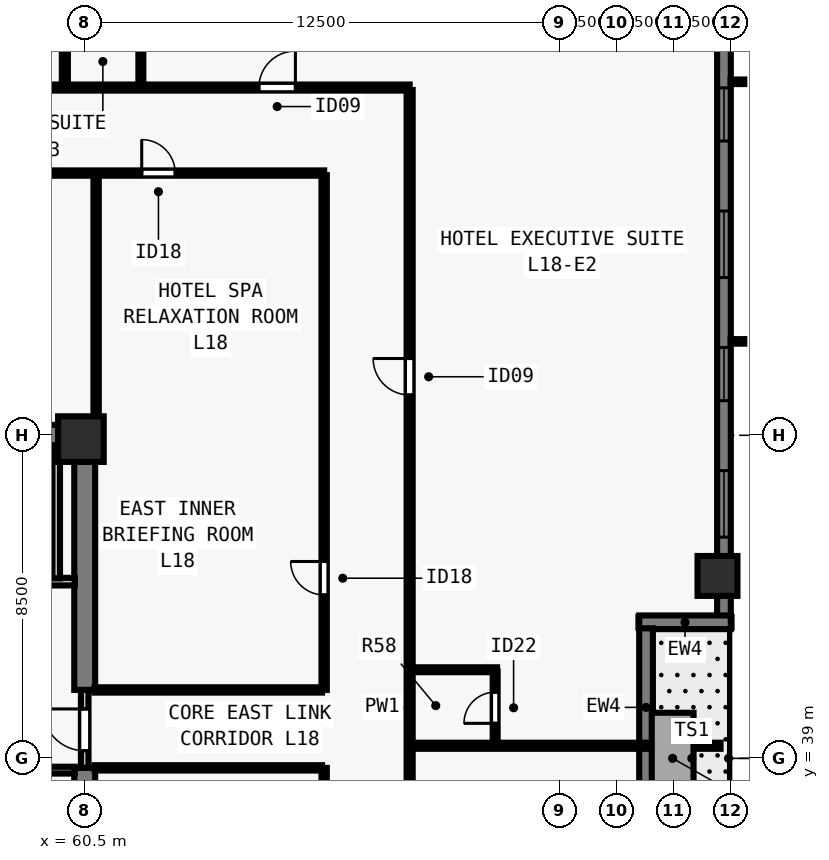
"""IFC4 building model, lengths in metres.
Left out: names, types, materials, properties, quantities, classifications, styles, units other than length and angle.
Written with IfcOpenShell. Run it as: python <this file> out.ifc"""

import sys

from ifc_helpers import new_model, si_unit, direction, frame, frame_2d, origin, origin_2d, place, context, subcontext, project, spatial, rectangle, extrude, element, fill, save


model = new_model("IFC4")
c1 = context("Model", 3, precision=1e-05, world=origin(), true_north=direction((0.0, 1.0)))
c2 = subcontext(c1, "Body", "Model", "MODEL_VIEW")
j1 = project(units=[si_unit("LENGTHUNIT", "METRE"), si_unit("PLANEANGLEUNIT", "RADIAN")], contexts=[c1])
p1 = place(None, origin())
s1 = spatial("IfcSite", under=j1, at=p1, CompositionType="ELEMENT")
p2 = place(p1, origin())
s2 = spatial("IfcBuilding", under=s1, at=p2, CompositionType="ELEMENT")
p3 = place(p2, frame((0.0, 0.0, 69.0)))
s3 = spatial("IfcBuildingStorey", under=s2, at=p3, CompositionType="ELEMENT", Elevation=69.0)
p4 = place(p3, frame((60.4, 47.4, 0.0), z_axis=(0.0, 0.0, 1.0), x_axis=(1.0, 0.0, 0.0)))
e1 = element("IfcColumn", 1, at=p4, inside=s3, PredefinedType="COLUMN", context=c2, shape_type="SweptSolid", body=[
    extrude(rectangle(XDim=1.2, YDim=1.2, at=origin_2d()), origin(), (0.0, 0.0, 1.0), 3.5),
])
p5 = place(p3, frame((77.15, 43.8, 0.0), z_axis=(0.0, 0.0, 1.0), x_axis=(0.0, 1.0, 0.0)))
e2 = element("IfcColumn", 2, at=p5, inside=s3, PredefinedType="COLUMN", context=c2, shape_type="SweptSolid", body=[
    extrude(rectangle(XDim=1.05, YDim=1.05, at=origin_2d()), origin(), (0.0, 0.0, 1.0), 3.5),
])
p6 = place(p3, frame((77.32, 61.5, 0.0), z_axis=(0.0, 0.0, 1.0), x_axis=(0.0, -1.0, 0.0)))
e3 = element("IfcWall", 3, at=p6, inside=s3, PredefinedType="SOLIDWALL", context=c2, shape_type="SweptSolid", body=[
    extrude(rectangle(XDim=18.762, YDim=0.36, at=frame_2d((9.381, 0.0))), origin(), (0.0, 0.0, 1.0), 3.28),
])
p7 = place(p6, frame((4.858, 0.0, 0.8)))
e4 = element("IfcOpeningElement", 4, at=p7, cuts=e3, PredefinedType="OPENING", context=c2, shape_type="SweptSolid", body=[
    extrude(rectangle(XDim=1.4, YDim=1.544, at=frame_2d((0.7, 0.772))), frame((0.0, 0.19, 0.0), z_axis=(0.0, -1.0, 0.0), x_axis=(1.0, 0.0, 0.0)), (0.0, 0.0, 1.0), 0.38),
])
p8 = place(p6, frame((8.098, 0.0, 0.8)))
e5 = element("IfcOpeningElement", 5, at=p8, cuts=e3, PredefinedType="OPENING", context=c2, shape_type="SweptSolid", body=[
    extrude(rectangle(XDim=1.75, YDim=1.544, at=frame_2d((0.875, 0.772))), frame((0.0, 0.19, 0.0), z_axis=(0.0, -1.0, 0.0), x_axis=(1.0, 0.0, 0.0)), (0.0, 0.0, 1.0), 0.38),
])
p9 = place(p6, frame((11.689, 0.0, 0.8)))
e6 = element("IfcOpeningElement", 6, at=p9, cuts=e3, PredefinedType="OPENING", context=c2, shape_type="SweptSolid", body=[
    extrude(rectangle(XDim=1.4, YDim=1.544, at=frame_2d((0.7, 0.772))), frame((0.0, 0.19, 0.0), z_axis=(0.0, -1.0, 0.0), x_axis=(1.0, 0.0, 0.0)), (0.0, 0.0, 1.0), 0.38),
])
p10 = place(p6, frame((14.929, 0.0, 0.8)))
e7 = element("IfcOpeningElement", 7, at=p10, cuts=e3, PredefinedType="OPENING", context=c2, shape_type="SweptSolid", body=[
    extrude(rectangle(XDim=1.75, YDim=1.544, at=frame_2d((0.875, 0.772))), frame((0.0, 0.19, 0.0), z_axis=(0.0, -1.0, 0.0), x_axis=(1.0, 0.0, 0.0)), (0.0, 0.0, 1.0), 0.38),
])
p11 = place(p3, frame((77.5, 42.58, 0.0), z_axis=(0.0, 0.0, 1.0), x_axis=(-1.0, 0.0, 0.0)))
e8 = element("IfcWall", 8, at=p11, inside=s3, PredefinedType="SOLIDWALL", context=c2, shape_type="SweptSolid", body=[
    extrude(rectangle(XDim=2.41, YDim=0.36, at=frame_2d((1.205, 0.0))), origin(), (0.0, 0.0, 1.0), 3.28),
])
p12 = place(p3, frame((75.27, 42.422, 0.0), z_axis=(0.0, 0.0, 1.0), x_axis=(0.0, -1.0, 0.0)))
e9 = element("IfcWall", 9, at=p12, inside=s3, PredefinedType="SOLIDWALL", context=c2, shape_type="SweptSolid", body=[
    extrude(rectangle(XDim=7.182, YDim=0.36, at=frame_2d((3.591, 0.0))), origin(), (0.0, 0.0, 1.0), 3.28),
])
p13 = place(p12, frame((4.311, 0.0, 0.0)))
e10 = element("IfcOpeningElement", 10, at=p13, cuts=e9, PredefinedType="OPENING", context=c2, shape_type="SweptSolid", body=[
    extrude(rectangle(XDim=1.0, YDim=2.15, at=frame_2d((0.5, 1.075))), frame((0.0, 0.19, 0.0), z_axis=(0.0, -1.0, 0.0), x_axis=(1.0, 0.0, 0.0)), (0.0, 0.0, 1.0), 0.38),
])
p14 = place(p3, frame((43.225, 47.5, 0.0), z_axis=(0.0, 0.0, 1.0), x_axis=(1.0, 0.0, 0.0)))
e11 = element("IfcWall", 11, at=p14, inside=s3, PredefinedType="SHEAR", context=c2, shape_type="SweptSolid", body=[
    extrude(rectangle(XDim=17.55, YDim=0.55, at=frame_2d((8.775, 0.0))), origin(), (0.0, 0.0, 1.0), 3.28),
])
p15 = place(p3, frame((60.5, 30.765, 0.0), z_axis=(0.0, 0.0, 1.0), x_axis=(0.0, 1.0, 0.0)))
e12 = element("IfcWall", 12, at=p15, inside=s3, PredefinedType="SHEAR", context=c2, shape_type="SweptSolid", body=[
    extrude(rectangle(XDim=7.985, YDim=0.55, at=frame_2d((3.993, 0.0))), origin(), (0.0, 0.0, 1.0), 3.28),
])
p16 = place(p3, frame((60.5, 40.8, 0.0), z_axis=(0.0, 0.0, 1.0), x_axis=(0.0, 1.0, 0.0)))
e13 = element("IfcWall", 13, at=p16, inside=s3, PredefinedType="SHEAR", context=c2, shape_type="SweptSolid", body=[
    extrude(rectangle(XDim=6.435, YDim=0.55, at=frame_2d((3.218, 0.0))), origin(), (0.0, 0.0, 1.0), 3.28),
])
p17 = place(p3, frame((60.5, 38.75, 0.0), z_axis=(0.0, 0.0, 1.0), x_axis=(0.0, 1.0, 0.0)))
e14 = element("IfcWall", 14, at=p17, inside=s3, PredefinedType="SOLIDWALL", context=c2, shape_type="SweptSolid", body=[
    extrude(rectangle(XDim=2.05, YDim=0.2, at=frame_2d((1.025, 0.0))), origin(), (0.0, 0.0, 1.0), 3.28),
])
p18 = place(p17, frame((0.45, 0.0, 0.0)))
e15 = element("IfcOpeningElement", 15, at=p18, cuts=e14, PredefinedType="OPENING", context=c2, shape_type="SweptSolid", body=[
    extrude(rectangle(XDim=1.1, YDim=2.15, at=frame_2d((0.55, 1.075))), frame((0.0, 0.11, 0.0), z_axis=(0.0, -1.0, 0.0), x_axis=(1.0, 0.0, 0.0)), (0.0, 0.0, 1.0), 0.22),
])
p19 = place(p3, frame((56.735, 43.65, 0.0), z_axis=(0.0, 0.0, 1.0), x_axis=(1.0, 0.0, 0.0)))
e16 = element("IfcWall", 16, at=p19, inside=s3, PredefinedType="SOLIDWALL", context=c2, shape_type="SweptSolid", body=[
    extrude(rectangle(XDim=3.505, YDim=0.2, at=frame_2d((1.752, 0.0))), origin(), (0.0, 0.0, 1.0), 3.28),
])
p20 = place(p19, frame((1.295, 0.0, 0.0)))
e17 = element("IfcOpeningElement", 17, at=p20, cuts=e16, PredefinedType="OPENING", context=c2, shape_type="SweptSolid", body=[
    extrude(rectangle(XDim=1.1, YDim=2.2, at=frame_2d((0.55, 1.1))), frame((0.0, 0.11, 0.0), z_axis=(0.0, -1.0, 0.0), x_axis=(1.0, 0.0, 0.0)), (0.0, 0.0, 1.0), 0.22),
])
p21 = place(p3, frame((59.75, 43.735, 0.0), z_axis=(0.0, 0.0, 1.0), x_axis=(0.0, 1.0, 0.0)))
e18 = element("IfcWall", 18, at=p21, inside=s3, PredefinedType="SOLIDWALL", context=c2, shape_type="SweptSolid", body=[
    extrude(rectangle(XDim=3.505, YDim=0.2, at=frame_2d((1.752, 0.0))), origin(), (0.0, 0.0, 1.0), 3.28),
])
p22 = place(p3, frame((34.95, 56.65, 0.0), z_axis=(0.0, 0.0, 1.0), x_axis=(1.0, 0.0, 0.0)))
e19 = element("IfcWall", 19, at=p22, inside=s3, PredefinedType="PARTITIONING", context=c2, shape_type="SweptSolid", body=[
    extrude(rectangle(XDim=34.1, YDim=0.16, at=frame_2d((17.05, 0.0))), origin(), (0.0, 0.0, 1.0), 3.28),
])
p23 = place(p22, frame((4.166, 0.0, 0.0)))
e20 = element("IfcOpeningElement", 20, at=p23, cuts=e19, PredefinedType="OPENING", context=c2, shape_type="SweptSolid", body=[
    extrude(rectangle(XDim=0.96, YDim=2.15, at=frame_2d((0.48, 1.075))), frame((0.0, 0.09, 0.0), z_axis=(0.0, -1.0, 0.0), x_axis=(1.0, 0.0, 0.0)), (0.0, 0.0, 1.0), 0.18),
])
p24 = place(p22, frame((17.73, 0.0, 0.0)))
e21 = element("IfcOpeningElement", 21, at=p24, cuts=e19, PredefinedType="OPENING", context=c2, shape_type="SweptSolid", body=[
    extrude(rectangle(XDim=0.96, YDim=2.15, at=frame_2d((0.48, 1.075))), frame((0.0, 0.09, 0.0), z_axis=(0.0, -1.0, 0.0), x_axis=(1.0, 0.0, 0.0)), (0.0, 0.0, 1.0), 0.18),
])
p25 = place(p22, frame((30.134, 0.0, 0.0)))
e22 = element("IfcOpeningElement", 22, at=p25, cuts=e19, PredefinedType="OPENING", context=c2, shape_type="SweptSolid", body=[
    extrude(rectangle(XDim=0.96, YDim=2.15, at=frame_2d((0.48, 1.075))), frame((0.0, 0.09, 0.0), z_axis=(0.0, -1.0, 0.0), x_axis=(1.0, 0.0, 0.0)), (0.0, 0.0, 1.0), 0.18),
])
p26 = place(p3, frame((69.05, 21.415, 0.0), z_axis=(0.0, 0.0, 1.0), x_axis=(0.0, 1.0, 0.0)))
e23 = element("IfcWall", 23, at=p26, inside=s3, PredefinedType="PARTITIONING", context=c2, shape_type="SweptSolid", body=[
    extrude(rectangle(XDim=35.17, YDim=0.16, at=frame_2d((17.585, 0.0))), origin(), (0.0, 0.0, 1.0), 3.28),
])
p27 = place(p26, frame((9.746, 0.0, 0.0)))
e24 = element("IfcOpeningElement", 24, at=p27, cuts=e23, PredefinedType="OPENING", context=c2, shape_type="SweptSolid", body=[
    extrude(rectangle(XDim=0.96, YDim=2.15, at=frame_2d((0.48, 1.075))), frame((0.0, 0.09, 0.0), z_axis=(0.0, -1.0, 0.0), x_axis=(1.0, 0.0, 0.0)), (0.0, 0.0, 1.0), 0.18),
])
p28 = place(p26, frame((27.146, 0.0, 0.0)))
e25 = element("IfcOpeningElement", 25, at=p28, cuts=e23, PredefinedType="OPENING", context=c2, shape_type="SweptSolid", body=[
    extrude(rectangle(XDim=0.96, YDim=2.15, at=frame_2d((0.48, 1.075))), frame((0.0, 0.09, 0.0), z_axis=(0.0, -1.0, 0.0), x_axis=(1.0, 0.0, 0.0)), (0.0, 0.0, 1.0), 0.18),
])
p29 = place(p3, frame((37.2, 54.4, 0.0), z_axis=(0.0, 0.0, 1.0), x_axis=(1.0, 0.0, 0.0)))
e26 = element("IfcWall", 26, at=p29, inside=s3, PredefinedType="PARTITIONING", context=c2, shape_type="SweptSolid", body=[
    extrude(rectangle(XDim=29.6, YDim=0.14, at=frame_2d((14.8, 0.0))), origin(), (0.0, 0.0, 1.0), 3.28),
])
p30 = place(p29, frame((2.2, 0.0, 0.0)))
e27 = element("IfcOpeningElement", 27, at=p30, cuts=e26, PredefinedType="OPENING", context=c2, shape_type="SweptSolid", body=[
    extrude(rectangle(XDim=0.88, YDim=2.1, at=frame_2d((0.44, 1.05))), frame((0.0, 0.08, 0.0), z_axis=(0.0, -1.0, 0.0), x_axis=(1.0, 0.0, 0.0)), (0.0, 0.0, 1.0), 0.16),
])
p31 = place(p29, frame((15.3, 0.0, 0.0)))
e28 = element("IfcOpeningElement", 28, at=p31, cuts=e26, PredefinedType="OPENING", context=c2, shape_type="SweptSolid", body=[
    extrude(rectangle(XDim=0.88, YDim=2.1, at=frame_2d((0.44, 1.05))), frame((0.0, 0.08, 0.0), z_axis=(0.0, -1.0, 0.0), x_axis=(1.0, 0.0, 0.0)), (0.0, 0.0, 1.0), 0.16),
])
p32 = place(p29, frame((24.8, 0.0, 0.0)))
e29 = element("IfcOpeningElement", 29, at=p32, cuts=e26, PredefinedType="OPENING", context=c2, shape_type="SweptSolid", body=[
    extrude(rectangle(XDim=0.88, YDim=2.1, at=frame_2d((0.44, 1.05))), frame((0.0, 0.08, 0.0), z_axis=(0.0, -1.0, 0.0), x_axis=(1.0, 0.0, 0.0)), (0.0, 0.0, 1.0), 0.16),
])
p33 = place(p3, frame((66.8, 23.655, 0.0), z_axis=(0.0, 0.0, 1.0), x_axis=(0.0, 1.0, 0.0)))
e30 = element("IfcWall", 30, at=p33, inside=s3, PredefinedType="PARTITIONING", context=c2, shape_type="SweptSolid", body=[
    extrude(rectangle(XDim=15.095, YDim=0.14, at=frame_2d((7.547, 0.0))), origin(), (0.0, 0.0, 1.0), 3.28),
])
p34 = place(p33, frame((2.445, 0.0, 0.0)))
e31 = element("IfcOpeningElement", 31, at=p34, cuts=e30, PredefinedType="OPENING", context=c2, shape_type="SweptSolid", body=[
    extrude(rectangle(XDim=0.88, YDim=2.1, at=frame_2d((0.44, 1.05))), frame((0.0, 0.08, 0.0), z_axis=(0.0, -1.0, 0.0), x_axis=(1.0, 0.0, 0.0)), (0.0, 0.0, 1.0), 0.16),
])
p35 = place(p3, frame((66.8, 40.8, 0.0), z_axis=(0.0, 0.0, 1.0), x_axis=(0.0, 1.0, 0.0)))
e32 = element("IfcWall", 32, at=p35, inside=s3, PredefinedType="PARTITIONING", context=c2, shape_type="SweptSolid", body=[
    extrude(rectangle(XDim=13.545, YDim=0.14, at=frame_2d((6.772, 0.0))), origin(), (0.0, 0.0, 1.0), 3.28),
])
p36 = place(p35, frame((2.5, 0.0, 0.0)))
e33 = element("IfcOpeningElement", 33, at=p36, cuts=e32, PredefinedType="OPENING", context=c2, shape_type="SweptSolid", body=[
    extrude(rectangle(XDim=0.88, YDim=2.1, at=frame_2d((0.44, 1.05))), frame((0.0, 0.08, 0.0), z_axis=(0.0, -1.0, 0.0), x_axis=(1.0, 0.0, 0.0)), (0.0, 0.0, 1.0), 0.16),
])
for number, where, z_axis, x_axis in (
    (34, (60.76, 38.75, 0.0), (0.0, 0.0, 1.0), (1.0, 0.0, 0.0)),
    (35, (60.76, 40.8, 0.0), (0.0, 0.0, 1.0), (1.0, 0.0, 0.0)),
):
    element("IfcWall", number, at=place(p3, frame(where, z_axis=z_axis, x_axis=x_axis)), inside=s3, PredefinedType="PARTITIONING", context=c2, shape_type="SweptSolid", body=[
        extrude(rectangle(XDim=5.985, YDim=0.14, at=frame_2d((2.993, 0.0))), origin(), (0.0, 0.0, 1.0), 3.28),
    ])
p37 = place(p3, frame((60.8, 47.76, 0.0), z_axis=(0.0, 0.0, 1.0), x_axis=(0.0, 1.0, 0.0)))
e36 = element("IfcWall", 36, at=p37, inside=s3, PredefinedType="PARTITIONING", context=c2, shape_type="SweptSolid", body=[
    extrude(rectangle(XDim=6.585, YDim=0.14, at=frame_2d((3.292, 0.0))), origin(), (0.0, 0.0, 1.0), 2.439),
])
p38 = place(p3, frame((59.978, 56.715, 0.0), z_axis=(0.0, 0.0, 1.0), x_axis=(0.0, 1.0, 0.0)))
e37 = element("IfcWall", 37, at=p38, inside=s3, PredefinedType="PARTITIONING", context=c2, shape_type="SweptSolid", body=[
    extrude(rectangle(XDim=7.44, YDim=0.16, at=frame_2d((3.72, 0.0))), origin(), (0.0, 0.0, 1.0), 3.28),
])
p39 = place(p3, frame((61.978, 56.715, 0.0), z_axis=(0.0, 0.0, 1.0), x_axis=(0.0, 1.0, 0.0)))
e38 = element("IfcWall", 38, at=p39, inside=s3, PredefinedType="PLUMBINGWALL", context=c2, shape_type="SweptSolid", body=[
    extrude(rectangle(XDim=2.235, YDim=0.13, at=frame_2d((1.117, 0.0))), origin(), (0.0, 0.0, 1.0), 3.28),
])
p40 = place(p3, frame((69.115, 39.332, 0.0), z_axis=(0.0, 0.0, 1.0), x_axis=(1.0, 0.0, 0.0)))
e39 = element("IfcWall", 39, at=p40, inside=s3, PredefinedType="PARTITIONING", context=c2, shape_type="SweptSolid", body=[
    extrude(rectangle(XDim=8.115, YDim=0.16, at=frame_2d((4.058, 0.0))), origin(), (0.0, 0.0, 1.0), 3.28),
])
p41 = place(p3, frame((69.115, 41.332, 0.0), z_axis=(0.0, 0.0, 1.0), x_axis=(1.0, 0.0, 0.0)))
e40 = element("IfcWall", 40, at=p41, inside=s3, PredefinedType="PLUMBINGWALL", context=c2, shape_type="SweptSolid", body=[
    extrude(rectangle(XDim=2.235, YDim=0.13, at=frame_2d((1.118, 0.0))), origin(), (0.0, 0.0, 1.0), 3.28),
])
p42 = place(p3, frame((71.3, 39.396, 0.0), z_axis=(0.0, 0.0, 1.0), x_axis=(0.0, 1.0, 0.0)))
e41 = element("IfcWall", 41, at=p42, inside=s3, PredefinedType="PLUMBINGWALL", context=c2, shape_type="SweptSolid", body=[
    extrude(rectangle(XDim=1.885, YDim=0.13, at=frame_2d((0.942, 0.0))), origin(), (0.0, 0.0, 1.0), 3.28),
])
p43 = place(p42, frame((0.525, 0.0, 0.0)))
e42 = element("IfcOpeningElement", 42, at=p43, cuts=e41, PredefinedType="OPENING", context=c2, shape_type="SweptSolid", body=[
    extrude(rectangle(XDim=0.82, YDim=2.1, at=frame_2d((0.41, 1.05))), frame((0.0, 0.075, 0.0), z_axis=(0.0, -1.0, 0.0), x_axis=(1.0, 0.0, 0.0)), (0.0, 0.0, 1.0), 0.15),
])
p44 = place(p3, frame((57.005, 38.69, 0.0), z_axis=(0.0, 0.0, 1.0), x_axis=(1.0, 0.0, 0.0)))
e43 = element("IfcWall", 43, at=p44, inside=s3, PredefinedType="SOLIDWALL", context=c2, shape_type="SweptSolid", body=[
    extrude(rectangle(XDim=3.23, YDim=0.18, at=frame_2d((1.615, 0.0))), origin(), (0.0, 0.0, 1.0), 3.28),
])
p45 = place(p44, frame((1.14, 0.0, 0.0)))
e44 = element("IfcOpeningElement", 44, at=p45, cuts=e43, PredefinedType="OPENING", context=c2, shape_type="SweptSolid", body=[
    extrude(rectangle(XDim=0.95, YDim=2.15, at=frame_2d((0.475, 1.075))), frame((0.0, 0.1, 0.0), z_axis=(0.0, -1.0, 0.0), x_axis=(1.0, 0.0, 0.0)), (0.0, 0.0, 1.0), 0.2),
])
p46 = place(p7, origin())
e45 = element("IfcWindow", 45, at=p46, inside=s3, PartitioningType="SINGLE_PANEL", PredefinedType="WINDOW", context=c2, shape_type="SweptSolid", body=[
    extrude(rectangle(XDim=1.4, YDim=1.544, at=frame_2d((0.7, 0.772))), frame((0.0, -0.05, 0.0), z_axis=(0.0, -1.0, 0.0), x_axis=(1.0, 0.0, 0.0)), (0.0, 0.0, 1.0), 0.06),
])
fill(e4, e45)
p47 = place(p8, origin())
e46 = element("IfcWindow", 46, at=p47, inside=s3, PartitioningType="SINGLE_PANEL", PredefinedType="WINDOW", context=c2, shape_type="SweptSolid", body=[
    extrude(rectangle(XDim=1.75, YDim=1.544, at=frame_2d((0.875, 0.772))), frame((0.0, -0.05, 0.0), z_axis=(0.0, -1.0, 0.0), x_axis=(1.0, 0.0, 0.0)), (0.0, 0.0, 1.0), 0.06),
])
fill(e5, e46)
p48 = place(p9, origin())
e47 = element("IfcWindow", 47, at=p48, inside=s3, PartitioningType="SINGLE_PANEL", PredefinedType="WINDOW", context=c2, shape_type="SweptSolid", body=[
    extrude(rectangle(XDim=1.4, YDim=1.544, at=frame_2d((0.7, 0.772))), frame((0.0, -0.05, 0.0), z_axis=(0.0, -1.0, 0.0), x_axis=(1.0, 0.0, 0.0)), (0.0, 0.0, 1.0), 0.06),
])
fill(e6, e47)
p49 = place(p10, origin())
e48 = element("IfcWindow", 48, at=p49, inside=s3, PartitioningType="SINGLE_PANEL", PredefinedType="WINDOW", context=c2, shape_type="SweptSolid", body=[
    extrude(rectangle(XDim=1.75, YDim=1.544, at=frame_2d((0.875, 0.772))), frame((0.0, -0.05, 0.0), z_axis=(0.0, -1.0, 0.0), x_axis=(1.0, 0.0, 0.0)), (0.0, 0.0, 1.0), 0.06),
])
fill(e7, e48)
p50 = place(p18, origin())
e49 = element("IfcDoor", 49, at=p50, inside=s3, OperationType="SINGLE_SWING_RIGHT", PredefinedType="DOOR", context=c2, shape_type="SweptSolid", body=[
    extrude(rectangle(XDim=1.1, YDim=2.15, at=frame_2d((0.55, 1.075))), frame((0.0, 0.025, 0.0), z_axis=(0.0, -1.0, 0.0), x_axis=(1.0, 0.0, 0.0)), (0.0, 0.0, 1.0), 0.05),
])
fill(e15, e49)
p51 = place(p32, origin())
e50 = element("IfcDoor", 50, at=p51, inside=s3, OperationType="SINGLE_SWING_LEFT", PredefinedType="DOOR", context=c2, shape_type="SweptSolid", body=[
    extrude(rectangle(XDim=0.88, YDim=2.1, at=frame_2d((0.44, 1.05))), frame((0.0, 0.025, 0.0), z_axis=(0.0, -1.0, 0.0), x_axis=(1.0, 0.0, 0.0)), (0.0, 0.0, 1.0), 0.05),
])
fill(e29, e50)
p52 = place(p36, origin())
e51 = element("IfcDoor", 51, at=p52, inside=s3, OperationType="SINGLE_SWING_RIGHT", PredefinedType="DOOR", context=c2, shape_type="SweptSolid", body=[
    extrude(rectangle(XDim=0.88, YDim=2.1, at=frame_2d((0.44, 1.05))), frame((0.0, 0.025, 0.0), z_axis=(0.0, -1.0, 0.0), x_axis=(1.0, 0.0, 0.0)), (0.0, 0.0, 1.0), 0.05),
])
fill(e33, e51)
p53 = place(p25, origin())
e52 = element("IfcDoor", 52, at=p53, inside=s3, OperationType="SINGLE_SWING_RIGHT", PredefinedType="DOOR", context=c2, shape_type="SweptSolid", body=[
    extrude(rectangle(XDim=0.96, YDim=2.15, at=frame_2d((0.48, 1.075))), frame((0.0, 0.025, 0.0), z_axis=(0.0, -1.0, 0.0), x_axis=(1.0, 0.0, 0.0)), (0.0, 0.0, 1.0), 0.05),
])
fill(e22, e52)
p54 = place(p43, origin())
e53 = element("IfcDoor", 53, at=p54, inside=s3, OperationType="SINGLE_SWING_LEFT", PredefinedType="DOOR", context=c2, shape_type="SweptSolid", body=[
    extrude(rectangle(XDim=0.82, YDim=2.1, at=frame_2d((0.41, 1.05))), frame((0.0, 0.025, 0.0), z_axis=(0.0, -1.0, 0.0), x_axis=(1.0, 0.0, 0.0)), (0.0, 0.0, 1.0), 0.05),
])
fill(e42, e53)
p55 = place(p28, origin())
e54 = element("IfcDoor", 54, at=p55, inside=s3, OperationType="SINGLE_SWING_RIGHT", PredefinedType="DOOR", context=c2, shape_type="SweptSolid", body=[
    extrude(rectangle(XDim=0.96, YDim=2.15, at=frame_2d((0.48, 1.075))), frame((0.0, 0.025, 0.0), z_axis=(0.0, -1.0, 0.0), x_axis=(1.0, 0.0, 0.0)), (0.0, 0.0, 1.0), 0.05),
])
fill(e25, e54)
save(model, sys.argv[1])
